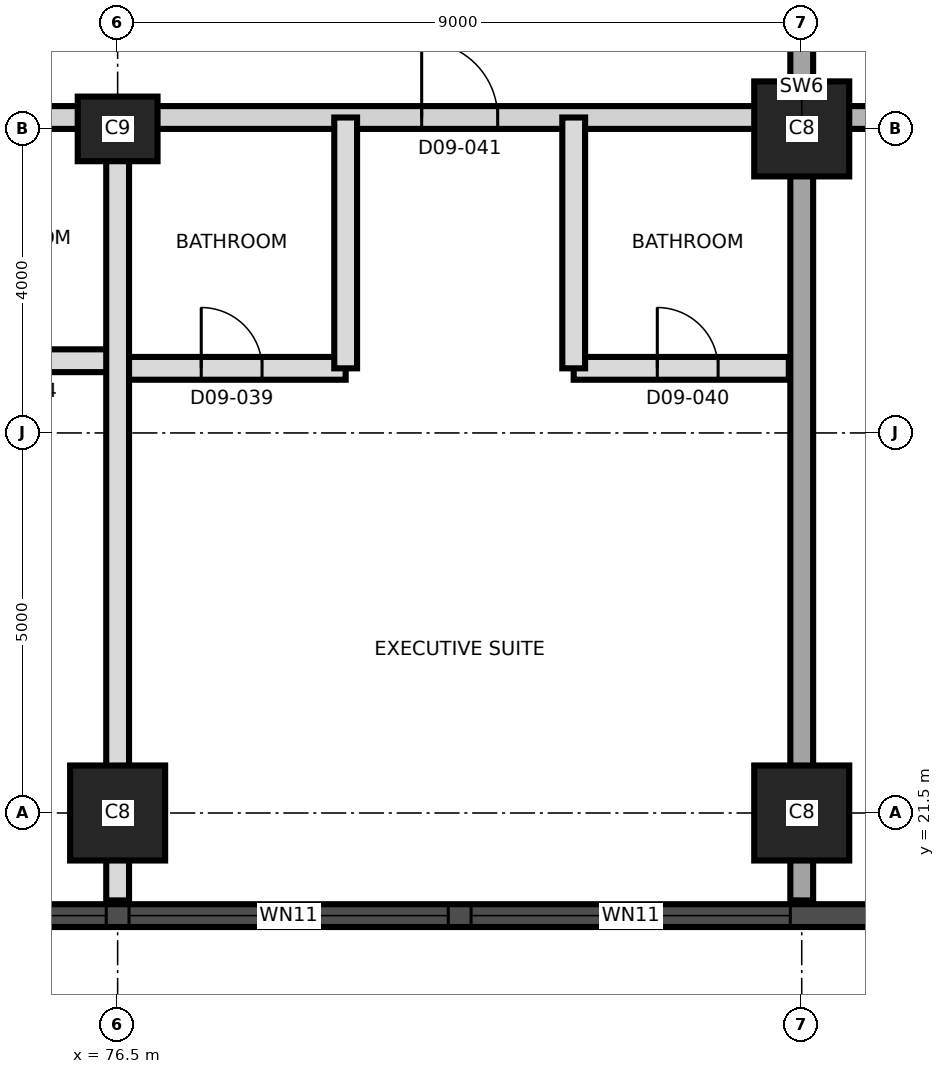
"""IFC4 building model, lengths in metres.
Left out: names, types, materials, properties, quantities, classifications, styles, units other than length and angle.
Written with IfcOpenShell. Run it as: python <this file> out.ifc"""

import sys

from ifc_helpers import new_model, si_unit, direction, frame, frame_2d, origin, origin_2d, place, context, subcontext, project, spatial, rectangle, extrude, element, fill, save


model = new_model("IFC4")
c1 = context("Model", 3, precision=1e-05, world=origin(), true_north=direction((0.0, 1.0)))
c2 = subcontext(c1, "Body", "Model", "MODEL_VIEW")
j1 = project(units=[si_unit("LENGTHUNIT", "METRE"), si_unit("PLANEANGLEUNIT", "RADIAN")], contexts=[c1])
p1 = place(None, origin())
s1 = spatial("IfcSite", under=j1, at=p1, CompositionType="ELEMENT")
p2 = place(p1, origin())
s2 = spatial("IfcBuilding", under=s1, at=p2, CompositionType="ELEMENT")
p3 = place(p2, frame((0.0, 0.0, 109.3)))
s3 = spatial("IfcBuildingStorey", under=s2, at=p3, CompositionType="ELEMENT", Elevation=109.3)
for number, where, z_axis, x_axis in (
    (1, (76.5, 21.5, 0.0), (0.0, 0.0, 1.0), (1.0, 0.0, 0.0)),
    (2, (85.5, 21.5, 0.0), (0.0, 0.0, 1.0), (1.0, 0.0, 0.0)),
):
    element("IfcColumn", number, at=place(p3, frame(where, z_axis=z_axis, x_axis=x_axis)), inside=s3, PredefinedType="COLUMN", context=c2, shape_type="SweptSolid", body=[
        extrude(rectangle(XDim=1.25, YDim=1.25, at=origin_2d()), origin(), (0.0, 0.0, 1.0), 3.7),
    ])
p4 = place(p3, frame((76.5, 30.5, 0.0), z_axis=(0.0, 0.0, 1.0), x_axis=(1.0, 0.0, 0.0)))
e3 = element("IfcColumn", 3, at=p4, inside=s3, PredefinedType="COLUMN", context=c2, shape_type="SweptSolid", body=[
    extrude(rectangle(XDim=1.05, YDim=0.85, at=origin_2d()), origin(), (0.0, 0.0, 1.0), 3.7),
])
p5 = place(p3, frame((85.5, 30.5, 0.0), z_axis=(0.0, 0.0, 1.0), x_axis=(1.0, 0.0, 0.0)))
e4 = element("IfcColumn", 4, at=p5, inside=s3, PredefinedType="COLUMN", context=c2, shape_type="SweptSolid", body=[
    extrude(rectangle(XDim=1.25, YDim=1.25, at=origin_2d()), origin(), (0.0, 0.0, 1.0), 3.7),
])
p6 = place(p3, frame((85.5, 20.35, 0.0), z_axis=(0.0, 0.0, 1.0), x_axis=(0.0, 1.0, 0.0)))
e5 = element("IfcWall", 5, at=p6, inside=s3, PredefinedType="SHEAR", context=c2, shape_type="SweptSolid", body=[
    extrude(rectangle(XDim=20.3, YDim=0.3, at=frame_2d((10.15, 0.0))), origin(), (0.0, 0.0, 1.0), 3.7),
])
p7 = place(p6, frame((11.35, 0.0, 0.0)))
e6 = element("IfcOpeningElement", 6, at=p7, cuts=e5, PredefinedType="OPENING", context=c2, shape_type="SweptSolid", body=[
    extrude(rectangle(XDim=1.4, YDim=2.1, at=frame_2d((0.7, 1.05))), frame((0.0, 0.16, 0.0), z_axis=(0.0, -1.0, 0.0), x_axis=(1.0, 0.0, 0.0)), (0.0, 0.0, 1.0), 0.32),
])
p8 = place(p3, frame((44.011, 20.15, 0.0), z_axis=(0.0, 0.0, 1.0), x_axis=(1.0, 0.0, 0.0)))
e7 = element("IfcWall", 7, at=p8, inside=s3, PredefinedType="SOLIDWALL", context=c2, shape_type="SweptSolid", body=[
    extrude(rectangle(XDim=43.476, YDim=0.3, at=frame_2d((21.738, 0.0))), origin(), (0.0, 0.0, 1.0), 3.4),
])
p9 = place(p8, frame((1.845, 0.0, 0.3)))
e8 = element("IfcOpeningElement", 8, at=p9, cuts=e7, PredefinedType="OPENING", context=c2, shape_type="SweptSolid", body=[
    extrude(rectangle(XDim=1.8, YDim=2.4, at=frame_2d((0.9, 1.2))), frame((0.0, 0.16, 0.0), z_axis=(0.0, -1.0, 0.0), x_axis=(1.0, 0.0, 0.0)), (0.0, 0.0, 1.0), 0.32),
])
p10 = place(p8, frame((5.639, 0.0, 0.9)))
e9 = element("IfcOpeningElement", 9, at=p10, cuts=e7, PredefinedType="OPENING", context=c2, shape_type="SweptSolid", body=[
    extrude(rectangle(XDim=4.2, YDim=1.5, at=frame_2d((2.1, 0.75))), frame((0.0, 0.16, 0.0), z_axis=(0.0, -1.0, 0.0), x_axis=(1.0, 0.0, 0.0)), (0.0, 0.0, 1.0), 0.32),
])
p11 = place(p8, frame((10.139, 0.0, 0.9)))
e10 = element("IfcOpeningElement", 10, at=p11, cuts=e7, PredefinedType="OPENING", context=c2, shape_type="SweptSolid", body=[
    extrude(rectangle(XDim=4.2, YDim=1.5, at=frame_2d((2.1, 0.75))), frame((0.0, 0.16, 0.0), z_axis=(0.0, -1.0, 0.0), x_axis=(1.0, 0.0, 0.0)), (0.0, 0.0, 1.0), 0.32),
])
p12 = place(p8, frame((14.639, 0.0, 0.9)))
e11 = element("IfcOpeningElement", 11, at=p12, cuts=e7, PredefinedType="OPENING", context=c2, shape_type="SweptSolid", body=[
    extrude(rectangle(XDim=4.2, YDim=1.5, at=frame_2d((2.1, 0.75))), frame((0.0, 0.16, 0.0), z_axis=(0.0, -1.0, 0.0), x_axis=(1.0, 0.0, 0.0)), (0.0, 0.0, 1.0), 0.32),
])
p13 = place(p8, frame((19.139, 0.0, 0.9)))
e12 = element("IfcOpeningElement", 12, at=p13, cuts=e7, PredefinedType="OPENING", context=c2, shape_type="SweptSolid", body=[
    extrude(rectangle(XDim=4.2, YDim=1.5, at=frame_2d((2.1, 0.75))), frame((0.0, 0.16, 0.0), z_axis=(0.0, -1.0, 0.0), x_axis=(1.0, 0.0, 0.0)), (0.0, 0.0, 1.0), 0.32),
])
p14 = place(p8, frame((23.639, 0.0, 0.9)))
e13 = element("IfcOpeningElement", 13, at=p14, cuts=e7, PredefinedType="OPENING", context=c2, shape_type="SweptSolid", body=[
    extrude(rectangle(XDim=4.2, YDim=1.5, at=frame_2d((2.1, 0.75))), frame((0.0, 0.16, 0.0), z_axis=(0.0, -1.0, 0.0), x_axis=(1.0, 0.0, 0.0)), (0.0, 0.0, 1.0), 0.32),
])
p15 = place(p8, frame((28.139, 0.0, 0.9)))
e14 = element("IfcOpeningElement", 14, at=p15, cuts=e7, PredefinedType="OPENING", context=c2, shape_type="SweptSolid", body=[
    extrude(rectangle(XDim=4.2, YDim=1.5, at=frame_2d((2.1, 0.75))), frame((0.0, 0.16, 0.0), z_axis=(0.0, -1.0, 0.0), x_axis=(1.0, 0.0, 0.0)), (0.0, 0.0, 1.0), 0.32),
])
p16 = place(p8, frame((32.639, 0.0, 0.9)))
e15 = element("IfcOpeningElement", 15, at=p16, cuts=e7, PredefinedType="OPENING", context=c2, shape_type="SweptSolid", body=[
    extrude(rectangle(XDim=4.2, YDim=1.5, at=frame_2d((2.1, 0.75))), frame((0.0, 0.16, 0.0), z_axis=(0.0, -1.0, 0.0), x_axis=(1.0, 0.0, 0.0)), (0.0, 0.0, 1.0), 0.32),
])
p17 = place(p8, frame((37.139, 0.0, 0.9)))
e16 = element("IfcOpeningElement", 16, at=p17, cuts=e7, PredefinedType="OPENING", context=c2, shape_type="SweptSolid", body=[
    extrude(rectangle(XDim=4.2, YDim=1.5, at=frame_2d((2.1, 0.75))), frame((0.0, 0.16, 0.0), z_axis=(0.0, -1.0, 0.0), x_axis=(1.0, 0.0, 0.0)), (0.0, 0.0, 1.0), 0.32),
])
p18 = place(p3, frame((76.5, 27.35, 0.0), z_axis=(0.0, 0.0, 1.0), x_axis=(1.0, 0.0, 0.0)))
e17 = element("IfcWall", 17, at=p18, inside=s3, PredefinedType="PARTITIONING", context=c2, shape_type="SweptSolid", body=[
    extrude(rectangle(XDim=3.0, YDim=0.3, at=frame_2d((1.5, 0.0))), origin(), (0.0, 0.0, 1.0), 3.4),
])
p19 = place(p18, frame((1.1, 0.0, 0.0)))
e18 = element("IfcOpeningElement", 18, at=p19, cuts=e17, PredefinedType="OPENING", context=c2, shape_type="SweptSolid", body=[
    extrude(rectangle(XDim=0.8, YDim=2.1, at=frame_2d((0.4, 1.05))), frame((0.0, 0.16, 0.0), z_axis=(0.0, -1.0, 0.0), x_axis=(1.0, 0.0, 0.0)), (0.0, 0.0, 1.0), 0.32),
])
p20 = place(p3, frame((82.5, 27.35, 0.0), z_axis=(0.0, 0.0, 1.0), x_axis=(1.0, 0.0, 0.0)))
e19 = element("IfcWall", 19, at=p20, inside=s3, PredefinedType="PARTITIONING", context=c2, shape_type="SweptSolid", body=[
    extrude(rectangle(XDim=2.83, YDim=0.3, at=frame_2d((1.415, 0.0))), origin(), (0.0, 0.0, 1.0), 3.4),
])
p21 = place(p20, frame((1.1, 0.0, 0.0)))
e20 = element("IfcOpeningElement", 20, at=p21, cuts=e19, PredefinedType="OPENING", context=c2, shape_type="SweptSolid", body=[
    extrude(rectangle(XDim=0.8, YDim=2.1, at=frame_2d((0.4, 1.05))), frame((0.0, 0.16, 0.0), z_axis=(0.0, -1.0, 0.0), x_axis=(1.0, 0.0, 0.0)), (0.0, 0.0, 1.0), 0.32),
])
p22 = place(p3, frame((73.8, 27.45, 0.0), z_axis=(0.0, 0.0, 1.0), x_axis=(1.0, 0.0, 0.0)))
e21 = element("IfcWall", 21, at=p22, inside=s3, PredefinedType="PARTITIONING", context=c2, shape_type="SweptSolid", body=[
    extrude(rectangle(XDim=2.7, YDim=0.3, at=frame_2d((1.35, 0.0))), origin(), (0.0, 0.0, 1.0), 3.4),
])
p23 = place(p22, frame((0.95, 0.0, 0.0)))
e22 = element("IfcOpeningElement", 22, at=p23, cuts=e21, PredefinedType="OPENING", context=c2, shape_type="SweptSolid", body=[
    extrude(rectangle(XDim=0.8, YDim=2.1, at=frame_2d((0.4, 1.05))), frame((0.0, 0.16, 0.0), z_axis=(0.0, -1.0, 0.0), x_axis=(1.0, 0.0, 0.0)), (0.0, 0.0, 1.0), 0.32),
])
p24 = place(p3, frame((58.8, 30.65, 0.0), z_axis=(0.0, 0.0, 1.0), x_axis=(1.0, 0.0, 0.0)))
e23 = element("IfcWall", 23, at=p24, inside=s3, PredefinedType="PARTITIONING", context=c2, shape_type="SweptSolid", body=[
    extrude(rectangle(XDim=26.53, YDim=0.3, at=frame_2d((13.265, 0.0))), origin(), (0.0, 0.0, 1.0), 3.4),
])
p25 = place(p24, frame((3.115, 0.0, 0.0)))
e24 = element("IfcOpeningElement", 24, at=p25, cuts=e23, PredefinedType="OPENING", context=c2, shape_type="SweptSolid", body=[
    extrude(rectangle(XDim=1.0, YDim=2.1, at=frame_2d((0.5, 1.05))), frame((0.0, 0.16, 0.0), z_axis=(0.0, -1.0, 0.0), x_axis=(1.0, 0.0, 0.0)), (0.0, 0.0, 1.0), 0.32),
])
p26 = place(p24, frame((6.065, 0.0, 0.0)))
e25 = element("IfcOpeningElement", 25, at=p26, cuts=e23, PredefinedType="OPENING", context=c2, shape_type="SweptSolid", body=[
    extrude(rectangle(XDim=1.4, YDim=2.1, at=frame_2d((0.7, 1.05))), frame((0.0, 0.16, 0.0), z_axis=(0.0, -1.0, 0.0), x_axis=(1.0, 0.0, 0.0)), (0.0, 0.0, 1.0), 0.32),
])
p27 = place(p24, frame((9.835, 0.0, 0.0)))
e26 = element("IfcOpeningElement", 26, at=p27, cuts=e23, PredefinedType="OPENING", context=c2, shape_type="SweptSolid", body=[
    extrude(rectangle(XDim=1.2, YDim=2.1, at=frame_2d((0.6, 1.05))), frame((0.0, 0.16, 0.0), z_axis=(0.0, -1.0, 0.0), x_axis=(1.0, 0.0, 0.0)), (0.0, 0.0, 1.0), 0.32),
])
p28 = place(p24, frame((13.085, 0.0, 0.0)))
e27 = element("IfcOpeningElement", 27, at=p28, cuts=e23, PredefinedType="OPENING", context=c2, shape_type="SweptSolid", body=[
    extrude(rectangle(XDim=1.0, YDim=2.1, at=frame_2d((0.5, 1.05))), frame((0.0, 0.16, 0.0), z_axis=(0.0, -1.0, 0.0), x_axis=(1.0, 0.0, 0.0)), (0.0, 0.0, 1.0), 0.32),
])
p29 = place(p24, frame((21.7, 0.0, 0.0)))
e28 = element("IfcOpeningElement", 28, at=p29, cuts=e23, PredefinedType="OPENING", context=c2, shape_type="SweptSolid", body=[
    extrude(rectangle(XDim=1.0, YDim=2.4, at=frame_2d((0.5, 1.2))), frame((0.0, 0.16, 0.0), z_axis=(0.0, -1.0, 0.0), x_axis=(1.0, 0.0, 0.0)), (0.0, 0.0, 1.0), 0.32),
])
p30 = place(p3, frame((85.67, 30.65, 0.0), z_axis=(0.0, 0.0, 1.0), x_axis=(1.0, 0.0, 0.0)))
e29 = element("IfcWall", 29, at=p30, inside=s3, PredefinedType="SHEAR", context=c2, shape_type="SweptSolid", body=[
    extrude(rectangle(XDim=9.58, YDim=0.3, at=frame_2d((4.79, 0.0))), origin(), (0.0, 0.0, 1.0), 3.4),
])
p31 = place(p30, frame((2.08, 0.0, 0.0)))
e30 = element("IfcOpeningElement", 30, at=p31, cuts=e29, PredefinedType="OPENING", context=c2, shape_type="SweptSolid", body=[
    extrude(rectangle(XDim=1.2, YDim=2.1, at=frame_2d((0.6, 1.05))), frame((0.0, 0.16, 0.0), z_axis=(0.0, -1.0, 0.0), x_axis=(1.0, 0.0, 0.0)), (0.0, 0.0, 1.0), 0.32),
])
p32 = place(p30, frame((5.63, 0.0, 0.0)))
e31 = element("IfcOpeningElement", 31, at=p32, cuts=e29, PredefinedType="OPENING", context=c2, shape_type="SweptSolid", body=[
    extrude(rectangle(XDim=1.0, YDim=2.1, at=frame_2d((0.5, 1.05))), frame((0.0, 0.16, 0.0), z_axis=(0.0, -1.0, 0.0), x_axis=(1.0, 0.0, 0.0)), (0.0, 0.0, 1.0), 0.32),
])
p33 = place(p3, frame((76.5, 20.35, 0.0), z_axis=(0.0, 0.0, 1.0), x_axis=(0.0, 1.0, 0.0)))
e32 = element("IfcWall", 32, at=p33, inside=s3, PredefinedType="PARTITIONING", context=c2, shape_type="SweptSolid", body=[
    extrude(rectangle(XDim=10.3, YDim=0.3, at=frame_2d((5.15, 0.0))), origin(), (0.0, 0.0, 1.0), 3.4),
])
for number, where, z_axis, x_axis in (
    (33, (79.5, 27.35, 0.0), (0.0, 0.0, 1.0), (0.0, 1.0, 0.0)),
    (34, (82.5, 27.35, 0.0), (0.0, 0.0, 1.0), (0.0, 1.0, 0.0)),
):
    element("IfcWall", number, at=place(p3, frame(where, z_axis=z_axis, x_axis=x_axis)), inside=s3, PredefinedType="PARTITIONING", context=c2, shape_type="SweptSolid", body=[
        extrude(rectangle(XDim=3.3, YDim=0.3, at=frame_2d((1.65, 0.0))), origin(), (0.0, 0.0, 1.0), 3.4),
    ])
p34 = place(p15, origin())
e35 = element("IfcWindow", 35, at=p34, inside=s3, PartitioningType="SINGLE_PANEL", PredefinedType="WINDOW", context=c2, shape_type="SweptSolid", body=[
    extrude(rectangle(XDim=4.2, YDim=1.5, at=frame_2d((2.1, 0.75))), frame((0.0, 0.03, 0.0), z_axis=(0.0, -1.0, 0.0), x_axis=(1.0, 0.0, 0.0)), (0.0, 0.0, 1.0), 0.06),
])
fill(e14, e35)
p35 = place(p16, origin())
e36 = element("IfcWindow", 36, at=p35, inside=s3, PartitioningType="SINGLE_PANEL", PredefinedType="WINDOW", context=c2, shape_type="SweptSolid", body=[
    extrude(rectangle(XDim=4.2, YDim=1.5, at=frame_2d((2.1, 0.75))), frame((0.0, 0.03, 0.0), z_axis=(0.0, -1.0, 0.0), x_axis=(1.0, 0.0, 0.0)), (0.0, 0.0, 1.0), 0.06),
])
fill(e15, e36)
p36 = place(p17, origin())
e37 = element("IfcWindow", 37, at=p36, inside=s3, PartitioningType="SINGLE_PANEL", PredefinedType="WINDOW", context=c2, shape_type="SweptSolid", body=[
    extrude(rectangle(XDim=4.2, YDim=1.5, at=frame_2d((2.1, 0.75))), frame((0.0, 0.03, 0.0), z_axis=(0.0, -1.0, 0.0), x_axis=(1.0, 0.0, 0.0)), (0.0, 0.0, 1.0), 0.06),
])
fill(e16, e37)
p37 = place(p19, origin())
e38 = element("IfcDoor", 38, at=p37, inside=s3, OperationType="SINGLE_SWING_LEFT", PredefinedType="DOOR", context=c2, shape_type="SweptSolid", body=[
    extrude(rectangle(XDim=0.8, YDim=2.1, at=frame_2d((0.4, 1.05))), frame((0.0, 0.025, 0.0), z_axis=(0.0, -1.0, 0.0), x_axis=(1.0, 0.0, 0.0)), (0.0, 0.0, 1.0), 0.05),
])
fill(e18, e38)
p38 = place(p21, origin())
e39 = element("IfcDoor", 39, at=p38, inside=s3, OperationType="SINGLE_SWING_RIGHT", PredefinedType="DOOR", context=c2, shape_type="SweptSolid", body=[
    extrude(rectangle(XDim=0.8, YDim=2.1, at=frame_2d((0.4, 1.05))), frame((0.0, 0.025, 0.0), z_axis=(0.0, -1.0, 0.0), x_axis=(1.0, 0.0, 0.0)), (0.0, 0.0, 1.0), 0.05),
])
fill(e20, e39)
p39 = place(p29, origin())
e40 = element("IfcDoor", 40, at=p39, inside=s3, OperationType="SINGLE_SWING_LEFT", PredefinedType="DOOR", context=c2, shape_type="SweptSolid", body=[
    extrude(rectangle(XDim=1.0, YDim=2.4, at=frame_2d((0.5, 1.2))), frame((0.0, 0.025, 0.0), z_axis=(0.0, -1.0, 0.0), x_axis=(1.0, 0.0, 0.0)), (0.0, 0.0, 1.0), 0.05),
])
fill(e28, e40)
save(model, sys.argv[1])
